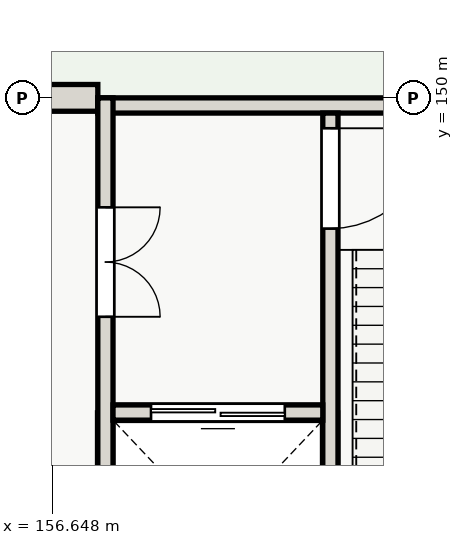
"""IFC4 building model, lengths in metres.
Left out: names, types, materials, properties, quantities, classifications, styles, units other than length and angle.
Written with IfcOpenShell. Run it as: python <this file> out.ifc"""

import sys

from ifc_helpers import new_model, si_unit, direction, frame, frame_2d, origin, place, context, subcontext, project, spatial, rectangle, extrude, element, fill, save


model = new_model("IFC4")
c1 = context("Model", 3, precision=1e-05, world=origin(), true_north=direction((0.0, 1.0)))
c2 = subcontext(c1, "Body", "Model", "MODEL_VIEW")
j1 = project(units=[si_unit("LENGTHUNIT", "METRE"), si_unit("PLANEANGLEUNIT", "RADIAN")], contexts=[c1])
p1 = place(None, origin())
s1 = spatial("IfcSite", under=j1, at=p1, CompositionType="ELEMENT")
p2 = place(p1, origin())
s2 = spatial("IfcBuilding", under=s1, at=p2, CompositionType="ELEMENT")
p3 = place(p2, origin())
s3 = spatial("IfcBuildingStorey", under=s2, at=p3, CompositionType="ELEMENT", Elevation=0.0)
p4 = place(p3, frame((156.0, 150.0, 0.0), z_axis=(0.0, 0.0, 1.0), x_axis=(1.0, 0.0, 0.0)))
e1 = element("IfcWall", 1, at=p4, inside=s3, PredefinedType="SHEAR", context=c2, shape_type="SweptSolid", body=[
    extrude(rectangle(XDim=1.4, YDim=0.44, at=frame_2d((0.7, 0.0))), origin(), (0.0, 0.0, 1.0), 4.2),
])
p5 = place(p3, frame((161.22, 144.82, -1.6), z_axis=(0.0, 0.0, 1.0), x_axis=(-1.0, 0.0, 0.0)))
e2 = element("IfcWall", 2, at=p5, inside=s3, PredefinedType="SHEAR", context=c2, shape_type="SweptSolid", body=[
    extrude(rectangle(XDim=3.7, YDim=0.25, at=frame_2d((1.85, 0.0))), origin(), (0.0, 0.0, 1.0), 1.6),
])
for number, where, z_axis, x_axis in (
    (3, (157.52, 144.82, -1.6), (0.0, 0.0, 1.0), (0.0, -1.0, 0.0)),
    (4, (161.22, 140.92, -1.6), (0.0, 0.0, 1.0), (0.0, 1.0, 0.0)),
):
    element("IfcWall", number, at=place(p3, frame(where, z_axis=z_axis, x_axis=x_axis)), inside=s3, PredefinedType="SHEAR", context=c2, shape_type="SweptSolid", body=[
        extrude(rectangle(XDim=3.9, YDim=0.25, at=frame_2d((1.95, 0.0))), origin(), (0.0, 0.0, 1.0), 1.6),
    ])
p6 = place(p3, frame((157.4, 149.875, 0.0), z_axis=(0.0, 0.0, 1.0), x_axis=(1.0, 0.0, 0.0)))
e5 = element("IfcWall", 5, at=p6, inside=s3, PredefinedType="SHEAR", context=c2, shape_type="SweptSolid", body=[
    extrude(rectangle(XDim=9.2, YDim=0.25, at=frame_2d((4.6, 0.0))), origin(), (0.0, 0.0, 1.0), 4.2),
])
p7 = place(p6, frame((5.9, 0.0, 0.0)))
e6 = element("IfcOpeningElement", 6, at=p7, cuts=e5, PredefinedType="OPENING", context=c2, shape_type="SweptSolid", body=[
    extrude(rectangle(XDim=1.9, YDim=2.2, at=frame_2d((0.95, 1.1))), frame((0.0, 0.135, 0.0), z_axis=(0.0, -1.0, 0.0), x_axis=(1.0, 0.0, 0.0)), (0.0, 0.0, 1.0), 0.27),
])
p8 = place(p3, frame((157.525, 150.0, 0.0), z_axis=(0.0, 0.0, 1.0), x_axis=(0.0, -1.0, 0.0)))
e7 = element("IfcWall", 7, at=p8, inside=s3, PredefinedType="SHEAR", context=c2, shape_type="SweptSolid", body=[
    extrude(rectangle(XDim=9.2, YDim=0.25, at=frame_2d((4.6, 0.0))), origin(), (0.0, 0.0, 1.0), 4.2),
])
p9 = place(p8, frame((1.8, 0.0, 0.0)))
e8 = element("IfcOpeningElement", 8, at=p9, cuts=e7, PredefinedType="OPENING", context=c2, shape_type="SweptSolid", body=[
    extrude(rectangle(XDim=1.8, YDim=2.15, at=frame_2d((0.9, 1.075))), frame((0.0, 0.135, 0.0), z_axis=(0.0, -1.0, 0.0), x_axis=(1.0, 0.0, 0.0)), (0.0, 0.0, 1.0), 0.27),
])
p10 = place(p3, frame((161.225, 149.75, 0.0), z_axis=(0.0, 0.0, 1.0), x_axis=(0.0, -1.0, 0.0)))
e9 = element("IfcWall", 9, at=p10, inside=s3, PredefinedType="SHEAR", context=c2, shape_type="SweptSolid", body=[
    extrude(rectangle(XDim=8.7, YDim=0.25, at=frame_2d((4.35, 0.0))), origin(), (0.0, 0.0, 1.0), 4.2),
])
p11 = place(p10, frame((0.25, 0.0, 0.0)))
e10 = element("IfcOpeningElement", 10, at=p11, cuts=e9, PredefinedType="OPENING", context=c2, shape_type="SweptSolid", body=[
    extrude(rectangle(XDim=1.65, YDim=2.1, at=frame_2d((0.825, 1.05))), frame((0.0, 0.135, 0.0), z_axis=(0.0, -1.0, 0.0), x_axis=(1.0, 0.0, 0.0)), (0.0, 0.0, 1.0), 0.27),
])
p12 = place(p3, frame((161.1, 144.825, 0.0), z_axis=(0.0, 0.0, 1.0), x_axis=(-1.0, 0.0, 0.0)))
e11 = element("IfcWall", 11, at=p12, inside=s3, PredefinedType="SHEAR", context=c2, shape_type="SweptSolid", body=[
    extrude(rectangle(XDim=3.45, YDim=0.25, at=frame_2d((1.725, 0.0))), origin(), (0.0, 0.0, 1.0), 4.2),
])
p13 = place(p12, frame((0.625, 0.0, 0.0)))
e12 = element("IfcOpeningElement", 12, at=p13, cuts=e11, PredefinedType="OPENING", context=c2, shape_type="SweptSolid", body=[
    extrude(rectangle(XDim=2.2, YDim=2.35, at=frame_2d((1.1, 1.175))), frame((0.0, 0.135, 0.0), z_axis=(0.0, -1.0, 0.0), x_axis=(1.0, 0.0, 0.0)), (0.0, 0.0, 1.0), 0.27),
])
p14 = place(p9, origin())
e13 = element("IfcDoor", 13, at=p14, inside=s3, OperationType="DOUBLE_DOOR_SINGLE_SWING", PredefinedType="DOOR", context=c2, shape_type="SweptSolid", body=[
    extrude(rectangle(XDim=1.8, YDim=2.15, at=frame_2d((0.9, 1.075))), frame((0.0, 0.025, 0.0), z_axis=(0.0, -1.0, 0.0), x_axis=(1.0, 0.0, 0.0)), (0.0, 0.0, 1.0), 0.05),
])
fill(e8, e13)
p15 = place(p11, origin())
e14 = element("IfcDoor", 14, at=p15, inside=s3, OperationType="SINGLE_SWING_LEFT", PredefinedType="DOOR", context=c2, shape_type="SweptSolid", body=[
    extrude(rectangle(XDim=1.65, YDim=2.1, at=frame_2d((0.825, 1.05))), frame((0.0, 0.025, 0.0), z_axis=(0.0, -1.0, 0.0), x_axis=(1.0, 0.0, 0.0)), (0.0, 0.0, 1.0), 0.05),
])
fill(e10, e14)
p16 = place(p13, origin())
e15 = element("IfcDoor", 15, at=p16, inside=s3, OperationType="SLIDING_TO_LEFT", PredefinedType="DOOR", context=c2, shape_type="SweptSolid", body=[
    extrude(rectangle(XDim=2.2, YDim=2.35, at=frame_2d((1.1, 1.175))), frame((0.0, 0.025, 0.0), z_axis=(0.0, -1.0, 0.0), x_axis=(1.0, 0.0, 0.0)), (0.0, 0.0, 1.0), 0.05),
])
fill(e12, e15)
save(model, sys.argv[1])
